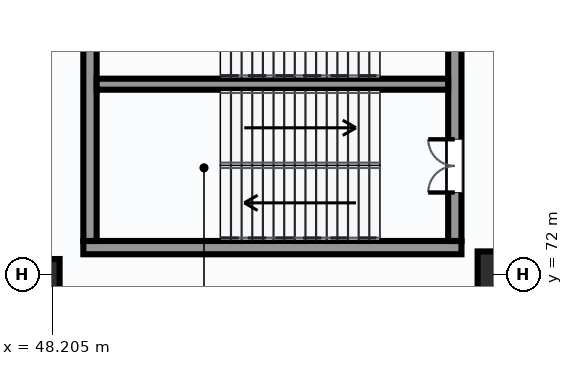
"""IFC4 building model, lengths in metres.
Left out: names, types, materials, properties, quantities, classifications, styles, units other than length and angle.
Written with IfcOpenShell. Run it as: python <this file> out.ifc"""

import sys

from ifc_helpers import new_model, si_unit, direction, frame, frame_2d, origin, origin_2d, place, context, subcontext, project, spatial, rectangle, extrude, element, fill, save


model = new_model("IFC4")
c1 = context("Model", 3, precision=1e-05, world=origin(), true_north=direction((0.0, 1.0)))
c2 = subcontext(c1, "Body", "Model", "MODEL_VIEW")
j1 = project(units=[si_unit("LENGTHUNIT", "METRE"), si_unit("PLANEANGLEUNIT", "RADIAN")], contexts=[c1])
p1 = place(None, origin())
s1 = spatial("IfcSite", under=j1, at=p1, CompositionType="ELEMENT")
p2 = place(p1, origin())
s2 = spatial("IfcBuilding", under=s1, at=p2, CompositionType="ELEMENT")
p3 = place(p2, origin())
s3 = spatial("IfcBuildingStorey", under=s2, at=p3, CompositionType="ELEMENT", Elevation=0.0)
p4 = place(p3, frame((48.0, 72.0, 0.0), z_axis=(0.0, 0.0, 1.0), x_axis=(1.0, 0.0, 0.0)))
e1 = element("IfcColumn", 1, at=p4, inside=s3, PredefinedType="COLUMN", context=c2, shape_type="SweptSolid", body=[
    extrude(rectangle(XDim=0.8, YDim=0.8, at=origin_2d()), origin(), (0.0, 0.0, 1.0), 5.4),
])
p5 = place(p3, frame((60.0, 72.0, 0.0), z_axis=(0.0, 0.0, 1.0), x_axis=(1.0, 0.0, 0.0)))
e2 = element("IfcColumn", 2, at=p5, inside=s3, PredefinedType="COLUMN", context=c2, shape_type="SweptSolid", body=[
    extrude(rectangle(XDim=1.2, YDim=1.2, at=origin_2d()), origin(), (0.0, 0.0, 1.0), 5.4),
])
p6 = place(p3, frame((49.025, 72.7, 0.0), z_axis=(0.0, 0.0, 1.0), x_axis=(1.0, 0.0, 0.0)))
e3 = element("IfcWall", 3, at=p6, inside=s3, PredefinedType="SHEAR", context=c2, shape_type="SweptSolid", body=[
    extrude(rectangle(XDim=9.95, YDim=0.35, at=frame_2d((4.975, 0.0))), origin(), (0.0, 0.0, 1.0), 5.4),
])
p7 = place(p3, frame((49.2, 72.875, 0.0), z_axis=(0.0, 0.0, 1.0), x_axis=(0.0, 1.0, 0.0)))
e4 = element("IfcWall", 4, at=p7, inside=s3, PredefinedType="SHEAR", context=c2, shape_type="SweptSolid", body=[
    extrude(rectangle(XDim=8.25, YDim=0.35, at=frame_2d((4.125, 0.0))), origin(), (0.0, 0.0, 1.0), 5.4),
])
p8 = place(p3, frame((58.8, 72.875, 0.0), z_axis=(0.0, 0.0, 1.0), x_axis=(0.0, 1.0, 0.0)))
e5 = element("IfcWall", 5, at=p8, inside=s3, PredefinedType="SHEAR", context=c2, shape_type="SweptSolid", body=[
    extrude(rectangle(XDim=8.25, YDim=0.35, at=frame_2d((4.125, 0.0))), origin(), (0.0, 0.0, 1.0), 5.4),
])
p9 = place(p8, frame((1.275, 0.0, 0.0)))
e6 = element("IfcOpeningElement", 6, at=p9, cuts=e5, PredefinedType="OPENING", context=c2, shape_type="SweptSolid", body=[
    extrude(rectangle(XDim=1.4, YDim=2.2, at=frame_2d((0.7, 1.1))), frame((0.0, 0.185, 0.0), z_axis=(0.0, -1.0, 0.0), x_axis=(1.0, 0.0, 0.0)), (0.0, 0.0, 1.0), 0.37),
])
p10 = place(p8, frame((5.615, 0.0, 0.0)))
e7 = element("IfcOpeningElement", 7, at=p10, cuts=e5, PredefinedType="OPENING", context=c2, shape_type="SweptSolid", body=[
    extrude(rectangle(XDim=1.32, YDim=2.2, at=frame_2d((0.66, 1.1))), frame((0.0, 0.185, 0.0), z_axis=(0.0, -1.0, 0.0), x_axis=(1.0, 0.0, 0.0)), (0.0, 0.0, 1.0), 0.37),
])
p11 = place(p3, frame((49.375, 77.0, 0.0), z_axis=(0.0, 0.0, 1.0), x_axis=(1.0, 0.0, 0.0)))
e8 = element("IfcWall", 8, at=p11, inside=s3, PredefinedType="SHEAR", context=c2, shape_type="SweptSolid", body=[
    extrude(rectangle(XDim=9.25, YDim=0.29, at=frame_2d((4.625, 0.0))), origin(), (0.0, 0.0, 1.0), 5.4),
])
p12 = place(p9, origin())
e9 = element("IfcDoor", 9, at=p12, inside=s3, OperationType="DOUBLE_DOOR_SINGLE_SWING", PredefinedType="DOOR", context=c2, shape_type="SweptSolid", body=[
    extrude(rectangle(XDim=1.4, YDim=2.2, at=frame_2d((0.7, 1.1))), frame((0.0, 0.025, 0.0), z_axis=(0.0, -1.0, 0.0), x_axis=(1.0, 0.0, 0.0)), (0.0, 0.0, 1.0), 0.05),
])
fill(e6, e9)
save(model, sys.argv[1])
